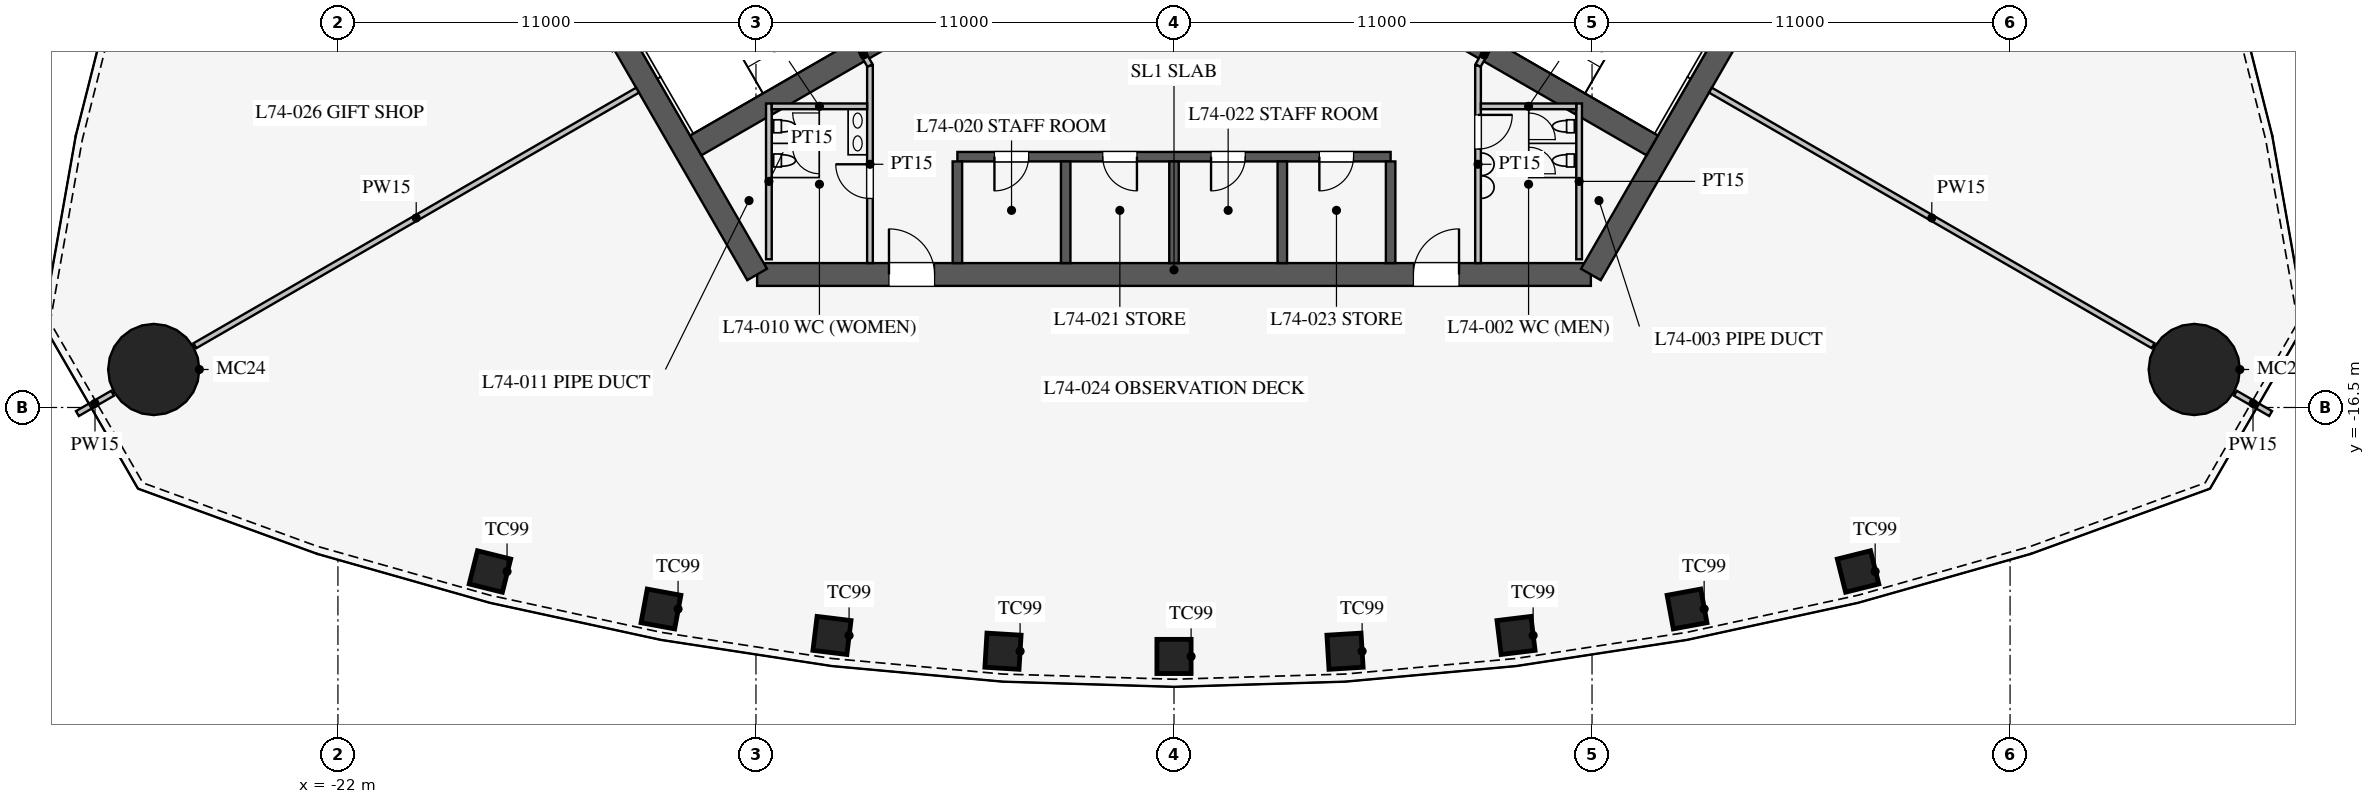
"""IFC4 building model, lengths in metres.
Left out: names, types, materials, properties, quantities, classifications, styles, units other than length and angle.
Written with IfcOpenShell. Run it as: python <this file> out.ifc"""

import sys

from ifc_helpers import new_model, si_unit, direction, frame, frame_2d, origin, origin_2d, place, context, subcontext, project, spatial, rectangle, circle, extrude, element, fill, save


model = new_model("IFC4")
c1 = context("Model", 3, precision=1e-05, world=origin(), true_north=direction((0.0, 1.0)))
c2 = subcontext(c1, "Body", "Model", "MODEL_VIEW")
j1 = project(units=[si_unit("LENGTHUNIT", "METRE"), si_unit("PLANEANGLEUNIT", "RADIAN")], contexts=[c1])
p1 = place(None, origin())
s1 = spatial("IfcSite", under=j1, at=p1, CompositionType="ELEMENT")
p2 = place(p1, origin())
s2 = spatial("IfcBuilding", under=s1, at=p2, CompositionType="ELEMENT")
p3 = place(p2, frame((0.0, 0.0, 322.5)))
s3 = spatial("IfcBuildingStorey", under=s2, at=p3, CompositionType="ELEMENT", Elevation=322.5)
for number, where, z_axis, x_axis in (
    (1, (-18.0, -20.816, 0.0), (0.0, 0.0, 1.0), (0.97, -0.242, 0.0)),
    (2, (-13.5, -21.803, 0.0), (0.0, 0.0, 1.0), (0.983, -0.182, 0.0)),
    (3, (-9.0, -22.499, 0.0), (0.0, 0.0, 1.0), (0.993, -0.121, 0.0)),
    (4, (-4.5, -22.914, 0.0), (0.0, 0.0, 1.0), (0.998, -0.061, 0.0)),
    (5, (0.0, -23.052, 0.0), (0.0, 0.0, 1.0), (1.0, 0.0, 0.0)),
    (6, (4.5, -22.914, 0.0), (0.0, 0.0, 1.0), (0.998, 0.061, 0.0)),
    (7, (9.0, -22.499, 0.0), (0.0, 0.0, 1.0), (0.993, 0.121, 0.0)),
    (8, (13.5, -21.803, 0.0), (0.0, 0.0, 1.0), (0.983, 0.182, 0.0)),
    (9, (18.0, -20.816, 0.0), (0.0, 0.0, 1.0), (0.97, 0.242, 0.0)),
):
    element("IfcColumn", number, at=place(p3, frame(where, z_axis=z_axis, x_axis=x_axis)), inside=s3, PredefinedType="COLUMN", context=c2, shape_type="SweptSolid", body=[
        extrude(rectangle(XDim=0.9, YDim=0.9, at=origin_2d()), origin(), (0.0, 0.0, 1.0), 6.0),
    ])
for number, where, z_axis, x_axis in (
    (10, (26.847, -15.5, 0.0), (0.0, 0.0, 1.0), (1.0, 0.0, 0.0)),
    (11, (-26.847, -15.5, 0.0), (0.0, 0.0, 1.0), (1.0, 0.0, 0.0)),
):
    element("IfcColumn", number, at=place(p3, frame(where, z_axis=z_axis, x_axis=x_axis)), inside=s3, PredefinedType="COLUMN", context=c2, shape_type="SweptSolid", body=[
        extrude(circle(Radius=1.2, at=origin_2d()), origin(), (0.0, 0.0, 1.0), 6.0),
    ])
p4 = place(p3, frame((-10.97, -13.0, 0.0), z_axis=(0.0, 0.0, 1.0), x_axis=(1.0, 0.0, 0.0)))
e12 = element("IfcWall", 12, at=p4, inside=s3, PredefinedType="SHEAR", context=c2, shape_type="SweptSolid", body=[
    extrude(rectangle(XDim=21.939, YDim=0.6, at=frame_2d((10.97, 0.0))), origin(), (0.0, 0.0, 1.0), 6.0),
])
p5 = place(p4, frame((17.27, 0.0, 0.0)))
e13 = element("IfcOpeningElement", 13, at=p5, cuts=e12, PredefinedType="OPENING", context=c2, shape_type="SweptSolid", body=[
    extrude(rectangle(XDim=1.2, YDim=2.1, at=frame_2d((0.6, 1.05))), frame((0.0, 0.31, 0.0), z_axis=(0.0, -1.0, 0.0), x_axis=(1.0, 0.0, 0.0)), (0.0, 0.0, 1.0), 0.62),
])
p6 = place(p4, frame((3.47, 0.0, 0.0)))
e14 = element("IfcOpeningElement", 14, at=p6, cuts=e12, PredefinedType="OPENING", context=c2, shape_type="SweptSolid", body=[
    extrude(rectangle(XDim=1.2, YDim=2.1, at=frame_2d((0.6, 1.05))), frame((0.0, 0.31, 0.0), z_axis=(0.0, -1.0, 0.0), x_axis=(1.0, 0.0, 0.0)), (0.0, 0.0, 1.0), 0.62),
])
for number, where, z_axis, x_axis in (
    (15, (10.97, -13.0, 0.0), (0.0, 0.0, 1.0), (0.5, 0.866, 0.0)),
    (16, (-16.743, -3.0, 0.0), (0.0, 0.0, 1.0), (0.5, -0.866, 0.0)),
):
    element("IfcWall", number, at=place(p3, frame(where, z_axis=z_axis, x_axis=x_axis)), inside=s3, PredefinedType="SHEAR", context=c2, shape_type="SweptSolid", body=[
        extrude(rectangle(XDim=11.547, YDim=0.6, at=frame_2d((5.773, 0.0))), origin(), (0.0, 0.0, 1.0), 6.0),
    ])
p7 = place(p3, frame((-5.7, -9.9, 0.0), z_axis=(0.0, 0.0, 1.0), x_axis=(1.0, 0.0, 0.0)))
e17 = element("IfcWall", 17, at=p7, inside=s3, PredefinedType="SHEAR", context=c2, shape_type="SweptSolid", body=[
    extrude(rectangle(XDim=11.4, YDim=0.25, at=frame_2d((5.7, 0.0))), origin(), (0.0, 0.0, 1.0), 6.0),
])
p8 = place(p7, frame((0.975, 0.0, 0.0)))
e18 = element("IfcOpeningElement", 18, at=p8, cuts=e17, PredefinedType="OPENING", context=c2, shape_type="SweptSolid", body=[
    extrude(rectangle(XDim=0.9, YDim=2.1, at=frame_2d((0.45, 1.05))), frame((0.0, 0.135, 0.0), z_axis=(0.0, -1.0, 0.0), x_axis=(1.0, 0.0, 0.0)), (0.0, 0.0, 1.0), 0.27),
])
p9 = place(p7, frame((3.825, 0.0, 0.0)))
e19 = element("IfcOpeningElement", 19, at=p9, cuts=e17, PredefinedType="OPENING", context=c2, shape_type="SweptSolid", body=[
    extrude(rectangle(XDim=0.9, YDim=2.1, at=frame_2d((0.45, 1.05))), frame((0.0, 0.135, 0.0), z_axis=(0.0, -1.0, 0.0), x_axis=(1.0, 0.0, 0.0)), (0.0, 0.0, 1.0), 0.27),
])
p10 = place(p7, frame((6.675, 0.0, 0.0)))
e20 = element("IfcOpeningElement", 20, at=p10, cuts=e17, PredefinedType="OPENING", context=c2, shape_type="SweptSolid", body=[
    extrude(rectangle(XDim=0.9, YDim=2.1, at=frame_2d((0.45, 1.05))), frame((0.0, 0.135, 0.0), z_axis=(0.0, -1.0, 0.0), x_axis=(1.0, 0.0, 0.0)), (0.0, 0.0, 1.0), 0.27),
])
p11 = place(p7, frame((9.525, 0.0, 0.0)))
e21 = element("IfcOpeningElement", 21, at=p11, cuts=e17, PredefinedType="OPENING", context=c2, shape_type="SweptSolid", body=[
    extrude(rectangle(XDim=0.9, YDim=2.1, at=frame_2d((0.45, 1.05))), frame((0.0, 0.135, 0.0), z_axis=(0.0, -1.0, 0.0), x_axis=(1.0, 0.0, 0.0)), (0.0, 0.0, 1.0), 0.27),
])
for number, where, z_axis, x_axis in (
    (22, (-5.7, -10.025, 0.0), (0.0, 0.0, 1.0), (0.0, -1.0, 0.0)),
    (23, (-2.85, -10.025, 0.0), (0.0, 0.0, 1.0), (0.0, -1.0, 0.0)),
    (24, (0.0, -10.025, 0.0), (0.0, 0.0, 1.0), (0.0, -1.0, 0.0)),
    (25, (2.85, -10.025, 0.0), (0.0, 0.0, 1.0), (0.0, -1.0, 0.0)),
    (26, (5.7, -10.025, 0.0), (0.0, 0.0, 1.0), (0.0, -1.0, 0.0)),
):
    element("IfcWall", number, at=place(p3, frame(where, z_axis=z_axis, x_axis=x_axis)), inside=s3, PredefinedType="SHEAR", context=c2, shape_type="SweptSolid", body=[
        extrude(rectangle(XDim=2.675, YDim=0.25, at=frame_2d((1.337, 0.0))), origin(), (0.0, 0.0, 1.0), 6.0),
    ])
for number, where, z_axis, x_axis in (
    (27, (4.638, -5.016, 0.0), (0.0, 0.0, 1.0), (0.866, -0.5, 0.0)),
    (28, (-4.638, -5.016, 0.0), (0.0, 0.0, 1.0), (-0.866, -0.5, 0.0)),
):
    element("IfcWall", number, at=place(p3, frame(where, z_axis=z_axis, x_axis=x_axis)), inside=s3, PredefinedType="SHEAR", context=c2, shape_type="SweptSolid", body=[
        extrude(rectangle(XDim=9.175, YDim=0.6, at=frame_2d((4.587, 0.0))), origin(), (0.0, 0.0, 1.0), 6.0),
    ])
p12 = place(p3, frame((8.0, -7.5, 0.0), z_axis=(0.0, 0.0, 1.0), x_axis=(0.0, -1.0, 0.0)))
e29 = element("IfcWall", 29, at=p12, inside=s3, PredefinedType="PARTITIONING", context=c2, shape_type="SweptSolid", body=[
    extrude(rectangle(XDim=5.2, YDim=0.15, at=frame_2d((2.6, 0.0))), origin(), (0.0, 0.0, 1.0), 5.75),
])
p13 = place(p12, frame((1.3, 0.0, 0.0)))
e30 = element("IfcOpeningElement", 30, at=p13, cuts=e29, PredefinedType="OPENING", context=c2, shape_type="SweptSolid", body=[
    extrude(rectangle(XDim=0.9, YDim=2.1, at=frame_2d((0.45, 1.05))), frame((0.0, 0.085, 0.0), z_axis=(0.0, -1.0, 0.0), x_axis=(1.0, 0.0, 0.0)), (0.0, 0.0, 1.0), 0.17),
])
p14 = place(p3, frame((-8.0, -7.5, 0.0), z_axis=(0.0, 0.0, 1.0), x_axis=(0.0, -1.0, 0.0)))
e31 = element("IfcWall", 31, at=p14, inside=s3, PredefinedType="PARTITIONING", context=c2, shape_type="SweptSolid", body=[
    extrude(rectangle(XDim=5.2, YDim=0.15, at=frame_2d((2.6, 0.0))), origin(), (0.0, 0.0, 1.0), 5.75),
])
p15 = place(p14, frame((2.6, 0.0, 0.0)))
e32 = element("IfcOpeningElement", 32, at=p15, cuts=e31, PredefinedType="OPENING", context=c2, shape_type="SweptSolid", body=[
    extrude(rectangle(XDim=0.9, YDim=2.1, at=frame_2d((0.45, 1.05))), frame((0.0, 0.085, 0.0), z_axis=(0.0, -1.0, 0.0), x_axis=(1.0, 0.0, 0.0)), (0.0, 0.0, 1.0), 0.17),
])
for number, where, z_axis, x_axis in (
    (33, (8.0, -7.5, 0.0), (0.0, 0.0, 1.0), (0.5, 0.866, 0.0)),
    (34, (-8.0, -7.5, 0.0), (0.0, 0.0, 1.0), (-0.5, 0.866, 0.0)),
):
    element("IfcWall", number, at=place(p3, frame(where, z_axis=z_axis, x_axis=x_axis)), inside=s3, PredefinedType="PARTITIONING", context=c2, shape_type="SweptSolid", body=[
        extrude(rectangle(XDim=0.645, YDim=0.15, at=frame_2d((0.323, 0.0))), origin(), (0.0, 0.0, 1.0), 5.75),
    ])
p16 = place(p3, frame((10.66, -8.5, 0.0), z_axis=(0.0, 0.0, 1.0), x_axis=(0.0, -1.0, 0.0)))
e35 = element("IfcWall", 35, at=p16, inside=s3, PredefinedType="PARTITIONING", context=c2, shape_type="SweptSolid", body=[
    extrude(rectangle(XDim=4.1, YDim=0.15, at=frame_2d((2.05, 0.0))), origin(), (0.0, 0.0, 1.0), 5.75),
])
p17 = place(p3, frame((8.075, -8.575, 0.0), z_axis=(0.0, 0.0, 1.0), x_axis=(1.0, 0.0, 0.0)))
e36 = element("IfcWall", 36, at=p17, inside=s3, PredefinedType="PARTITIONING", context=c2, shape_type="SweptSolid", body=[
    extrude(rectangle(XDim=2.51, YDim=0.15, at=frame_2d((1.255, 0.0))), origin(), (0.0, 0.0, 1.0), 5.75),
])
p18 = place(p3, frame((-10.66, -8.5, 0.0), z_axis=(0.0, 0.0, 1.0), x_axis=(0.0, -1.0, 0.0)))
e37 = element("IfcWall", 37, at=p18, inside=s3, PredefinedType="PARTITIONING", context=c2, shape_type="SweptSolid", body=[
    extrude(rectangle(XDim=4.1, YDim=0.15, at=frame_2d((2.05, 0.0))), origin(), (0.0, 0.0, 1.0), 5.75),
])
p19 = place(p3, frame((-8.075, -8.575, 0.0), z_axis=(0.0, 0.0, 1.0), x_axis=(-1.0, 0.0, 0.0)))
e38 = element("IfcWall", 38, at=p19, inside=s3, PredefinedType="PARTITIONING", context=c2, shape_type="SweptSolid", body=[
    extrude(rectangle(XDim=2.51, YDim=0.15, at=frame_2d((1.255, 0.0))), origin(), (0.0, 0.0, 1.0), 5.75),
])
p20 = place(p3, frame((14.116, -8.15, 0.0), z_axis=(0.0, 0.0, 1.0), x_axis=(0.866020541135, -0.500008422262, 0.0)))
e39 = element("IfcWall", 39, at=p20, inside=s3, PredefinedType="PARTITIONING", context=c2, shape_type="SweptSolid", body=[
    extrude(rectangle(XDim=13.45, YDim=0.15, at=frame_2d((6.725, 0.0))), origin(), (0.0, 0.0, 1.0), 3.75),
])
p21 = place(p3, frame((27.929, -16.125, 0.0), z_axis=(0.0, 0.0, 1.0), x_axis=(0.866086810508, -0.499893625349, 0.0)))
e40 = element("IfcWall", 40, at=p21, inside=s3, PredefinedType="PARTITIONING", context=c2, shape_type="SweptSolid", body=[
    extrude(rectangle(XDim=1.07, YDim=0.15, at=frame_2d((0.535, 0.0))), origin(), (0.0, 0.0, 1.0), 3.75),
])
p22 = place(p3, frame((-14.116, -8.15, 0.0), z_axis=(0.0, 0.0, 1.0), x_axis=(-0.866020541135, -0.500008422262, 0.0)))
e41 = element("IfcWall", 41, at=p22, inside=s3, PredefinedType="PARTITIONING", context=c2, shape_type="SweptSolid", body=[
    extrude(rectangle(XDim=13.45, YDim=0.15, at=frame_2d((6.725, 0.0))), origin(), (0.0, 0.0, 1.0), 3.75),
])
p23 = place(p3, frame((-27.929, -16.125, 0.0), z_axis=(0.0, 0.0, 1.0), x_axis=(-0.866086810508, -0.499893625349, 0.0)))
e42 = element("IfcWall", 42, at=p23, inside=s3, PredefinedType="PARTITIONING", context=c2, shape_type="SweptSolid", body=[
    extrude(rectangle(XDim=1.07, YDim=0.15, at=frame_2d((0.535, 0.0))), origin(), (0.0, 0.0, 1.0), 3.75),
])
p24 = place(p13, origin())
e43 = element("IfcDoor", 43, at=p24, inside=s3, OperationType="SINGLE_SWING_LEFT", PredefinedType="DOOR", context=c2, shape_type="SweptSolid", body=[
    extrude(rectangle(XDim=0.9, YDim=2.1, at=frame_2d((0.45, 1.05))), frame((0.0, 0.025, 0.0), z_axis=(0.0, -1.0, 0.0), x_axis=(1.0, 0.0, 0.0)), (0.0, 0.0, 1.0), 0.05),
])
fill(e30, e43)
p25 = place(p15, frame((0.9, 0.0, 0.0), z_axis=(0.0, 0.0, 1.0), x_axis=(-1.0, 0.0, 0.0)))
e44 = element("IfcDoor", 44, at=p25, inside=s3, OperationType="SINGLE_SWING_RIGHT", PredefinedType="DOOR", context=c2, shape_type="SweptSolid", body=[
    extrude(rectangle(XDim=0.9, YDim=2.1, at=frame_2d((0.45, 1.05))), frame((0.0, 0.025, 0.0), z_axis=(0.0, -1.0, 0.0), x_axis=(1.0, 0.0, 0.0)), (0.0, 0.0, 1.0), 0.05),
])
fill(e32, e44)
p26 = place(p5, origin())
e45 = element("IfcDoor", 45, at=p26, inside=s3, OperationType="SINGLE_SWING_RIGHT", PredefinedType="DOOR", context=c2, shape_type="SweptSolid", body=[
    extrude(rectangle(XDim=1.2, YDim=2.1, at=frame_2d((0.6, 1.05))), frame((0.0, 0.025, 0.0), z_axis=(0.0, -1.0, 0.0), x_axis=(1.0, 0.0, 0.0)), (0.0, 0.0, 1.0), 0.05),
])
fill(e13, e45)
p27 = place(p6, origin())
e46 = element("IfcDoor", 46, at=p27, inside=s3, OperationType="SINGLE_SWING_LEFT", PredefinedType="DOOR", context=c2, shape_type="SweptSolid", body=[
    extrude(rectangle(XDim=1.2, YDim=2.1, at=frame_2d((0.6, 1.05))), frame((0.0, 0.025, 0.0), z_axis=(0.0, -1.0, 0.0), x_axis=(1.0, 0.0, 0.0)), (0.0, 0.0, 1.0), 0.05),
])
fill(e14, e46)
p28 = place(p8, frame((0.9, 0.0, 0.0), z_axis=(0.0, 0.0, 1.0), x_axis=(-1.0, 0.0, 0.0)))
e47 = element("IfcDoor", 47, at=p28, inside=s3, OperationType="SINGLE_SWING_RIGHT", PredefinedType="DOOR", context=c2, shape_type="SweptSolid", body=[
    extrude(rectangle(XDim=0.9, YDim=2.1, at=frame_2d((0.45, 1.05))), frame((0.0, 0.025, 0.0), z_axis=(0.0, -1.0, 0.0), x_axis=(1.0, 0.0, 0.0)), (0.0, 0.0, 1.0), 0.05),
])
fill(e18, e47)
p29 = place(p9, frame((0.9, 0.0, 0.0), z_axis=(0.0, 0.0, 1.0), x_axis=(-1.0, 0.0, 0.0)))
e48 = element("IfcDoor", 48, at=p29, inside=s3, OperationType="SINGLE_SWING_LEFT", PredefinedType="DOOR", context=c2, shape_type="SweptSolid", body=[
    extrude(rectangle(XDim=0.9, YDim=2.1, at=frame_2d((0.45, 1.05))), frame((0.0, 0.025, 0.0), z_axis=(0.0, -1.0, 0.0), x_axis=(1.0, 0.0, 0.0)), (0.0, 0.0, 1.0), 0.05),
])
fill(e19, e48)
p30 = place(p10, frame((0.9, 0.0, 0.0), z_axis=(0.0, 0.0, 1.0), x_axis=(-1.0, 0.0, 0.0)))
e49 = element("IfcDoor", 49, at=p30, inside=s3, OperationType="SINGLE_SWING_RIGHT", PredefinedType="DOOR", context=c2, shape_type="SweptSolid", body=[
    extrude(rectangle(XDim=0.9, YDim=2.1, at=frame_2d((0.45, 1.05))), frame((0.0, 0.025, 0.0), z_axis=(0.0, -1.0, 0.0), x_axis=(1.0, 0.0, 0.0)), (0.0, 0.0, 1.0), 0.05),
])
fill(e20, e49)
p31 = place(p11, frame((0.9, 0.0, 0.0), z_axis=(0.0, 0.0, 1.0), x_axis=(-1.0, 0.0, 0.0)))
e50 = element("IfcDoor", 50, at=p31, inside=s3, OperationType="SINGLE_SWING_RIGHT", PredefinedType="DOOR", context=c2, shape_type="SweptSolid", body=[
    extrude(rectangle(XDim=0.9, YDim=2.1, at=frame_2d((0.45, 1.05))), frame((0.0, 0.025, 0.0), z_axis=(0.0, -1.0, 0.0), x_axis=(1.0, 0.0, 0.0)), (0.0, 0.0, 1.0), 0.05),
])
fill(e21, e50)
save(model, sys.argv[1])
